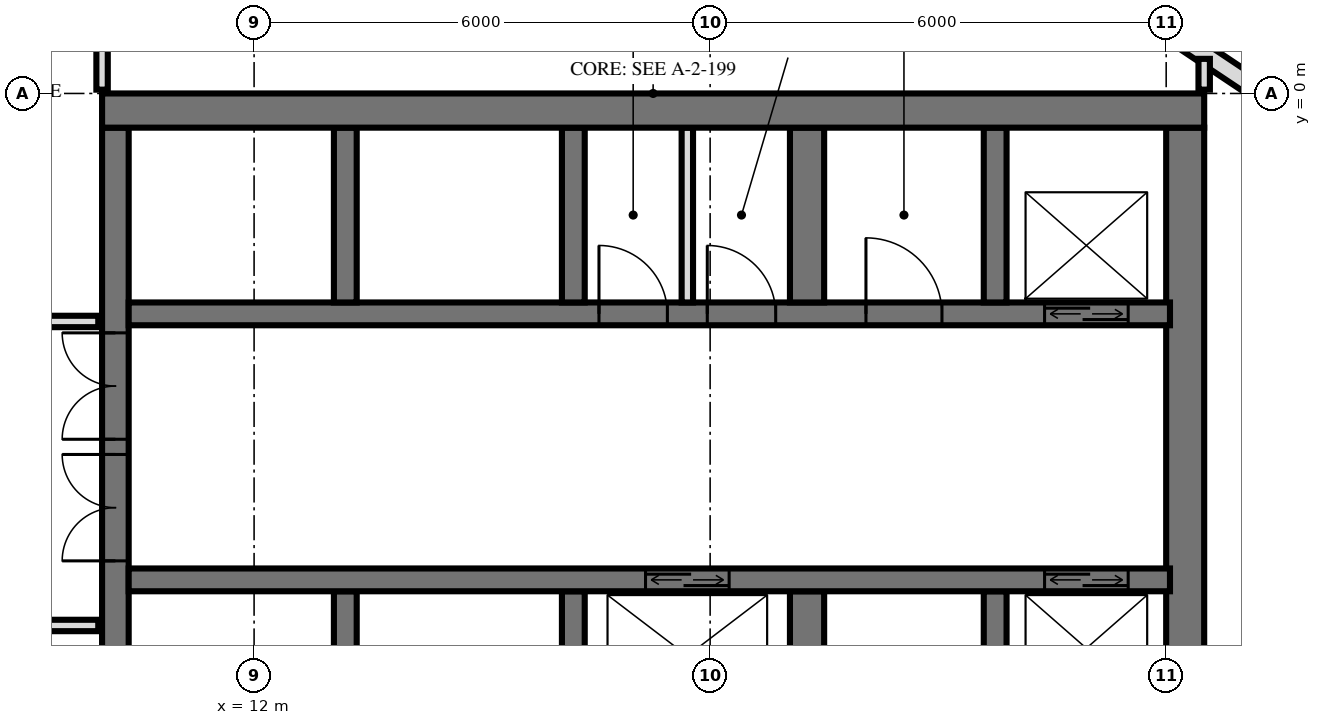
"""IFC4 building model, lengths in metres.
Left out: names, types, materials, properties, quantities, classifications, styles, units other than length and angle.
Written with IfcOpenShell. Run it as: python <this file> out.ifc"""

import sys

from ifc_helpers import new_model, si_unit, direction, frame, frame_2d, origin, place, context, subcontext, project, spatial, rectangle, extrude, element, fill, save


model = new_model("IFC4")
c1 = context("Model", 3, precision=1e-05, world=origin(), true_north=direction((0.0, 1.0)))
c2 = subcontext(c1, "Body", "Model", "MODEL_VIEW")
j1 = project(units=[si_unit("LENGTHUNIT", "METRE"), si_unit("PLANEANGLEUNIT", "RADIAN")], contexts=[c1])
p1 = place(None, origin())
s1 = spatial("IfcSite", under=j1, at=p1, CompositionType="ELEMENT")
p2 = place(p1, origin())
s2 = spatial("IfcBuilding", under=s1, at=p2, CompositionType="ELEMENT")
p3 = place(p2, frame((0.0, 0.0, 243.1)))
s3 = spatial("IfcBuildingStorey", under=s2, at=p3, CompositionType="ELEMENT", Elevation=243.1)
p4 = place(p3, frame((10.0, -0.225, 0.0), z_axis=(0.0, 0.0, 1.0), x_axis=(1.0, 0.0, 0.0)))
e1 = element("IfcWall", 1, at=p4, inside=s3, PredefinedType="SHEAR", context=c2, shape_type="SweptSolid", body=[
    extrude(rectangle(XDim=14.5, YDim=0.45, at=frame_2d((7.25, 0.0))), origin(), (0.0, 0.0, 1.0), 3.5),
])
p5 = place(p3, frame((10.175, -14.55, 0.0), z_axis=(0.0, 0.0, 1.0), x_axis=(0.0, 1.0, 0.0)))
e2 = element("IfcWall", 2, at=p5, inside=s3, PredefinedType="SHEAR", context=c2, shape_type="SweptSolid", body=[
    extrude(rectangle(XDim=14.1, YDim=0.35, at=frame_2d((7.05, 0.0))), origin(), (0.0, 0.0, 1.0), 3.5),
])
p6 = place(p5, frame((8.4, 0.0, 0.0)))
e3 = element("IfcOpeningElement", 3, at=p6, cuts=e2, PredefinedType="OPENING", context=c2, shape_type="SweptSolid", body=[
    extrude(rectangle(XDim=1.4, YDim=2.4, at=frame_2d((0.7, 1.2))), frame((0.0, 0.185, 0.0), z_axis=(0.0, -1.0, 0.0), x_axis=(1.0, 0.0, 0.0)), (0.0, 0.0, 1.0), 0.37),
])
p7 = place(p5, frame((10.0, 0.0, 0.0)))
e4 = element("IfcOpeningElement", 4, at=p7, cuts=e2, PredefinedType="OPENING", context=c2, shape_type="SweptSolid", body=[
    extrude(rectangle(XDim=1.4, YDim=2.4, at=frame_2d((0.7, 1.2))), frame((0.0, 0.185, 0.0), z_axis=(0.0, -1.0, 0.0), x_axis=(1.0, 0.0, 0.0)), (0.0, 0.0, 1.0), 0.37),
])
p8 = place(p5, frame((4.0, 0.0, 0.0)))
e5 = element("IfcOpeningElement", 5, at=p8, cuts=e2, PredefinedType="OPENING", context=c2, shape_type="SweptSolid", body=[
    extrude(rectangle(XDim=1.2, YDim=2.1, at=frame_2d((0.6, 1.05))), frame((0.0, 0.185, 0.0), z_axis=(0.0, -1.0, 0.0), x_axis=(1.0, 0.0, 0.0)), (0.0, 0.0, 1.0), 0.37),
])
p9 = place(p3, frame((24.25, -14.55, 0.0), z_axis=(0.0, 0.0, 1.0), x_axis=(0.0, 1.0, 0.0)))
e6 = element("IfcWall", 6, at=p9, inside=s3, PredefinedType="SHEAR", context=c2, shape_type="SweptSolid", body=[
    extrude(rectangle(XDim=14.1, YDim=0.5, at=frame_2d((7.05, 0.0))), origin(), (0.0, 0.0, 1.0), 3.5),
])
p10 = place(p3, frame((10.35, -2.9, 0.0), z_axis=(0.0, 0.0, 1.0), x_axis=(1.0, 0.0, 0.0)))
e7 = element("IfcWall", 7, at=p10, inside=s3, PredefinedType="SHEAR", context=c2, shape_type="SweptSolid", body=[
    extrude(rectangle(XDim=13.7, YDim=0.3, at=frame_2d((6.85, 0.0))), origin(), (0.0, 0.0, 1.0), 3.5),
])
p11 = place(p10, frame((12.05, 0.0, 0.0)))
e8 = element("IfcOpeningElement", 8, at=p11, cuts=e7, PredefinedType="OPENING", context=c2, shape_type="SweptSolid", body=[
    extrude(rectangle(XDim=1.1, YDim=2.1, at=frame_2d((0.55, 1.05))), frame((0.0, 0.16, 0.0), z_axis=(0.0, -1.0, 0.0), x_axis=(1.0, 0.0, 0.0)), (0.0, 0.0, 1.0), 0.32),
])
p12 = place(p10, frame((6.188, 0.0, 0.0)))
e9 = element("IfcOpeningElement", 9, at=p12, cuts=e7, PredefinedType="OPENING", context=c2, shape_type="SweptSolid", body=[
    extrude(rectangle(XDim=0.9, YDim=2.1, at=frame_2d((0.45, 1.05))), frame((0.0, 0.16, 0.0), z_axis=(0.0, -1.0, 0.0), x_axis=(1.0, 0.0, 0.0)), (0.0, 0.0, 1.0), 0.32),
])
p13 = place(p10, frame((7.613, 0.0, 0.0)))
e10 = element("IfcOpeningElement", 10, at=p13, cuts=e7, PredefinedType="OPENING", context=c2, shape_type="SweptSolid", body=[
    extrude(rectangle(XDim=0.9, YDim=2.1, at=frame_2d((0.45, 1.05))), frame((0.0, 0.16, 0.0), z_axis=(0.0, -1.0, 0.0), x_axis=(1.0, 0.0, 0.0)), (0.0, 0.0, 1.0), 0.32),
])
p14 = place(p10, frame((9.7, 0.0, 0.0)))
e11 = element("IfcOpeningElement", 11, at=p14, cuts=e7, PredefinedType="OPENING", context=c2, shape_type="SweptSolid", body=[
    extrude(rectangle(XDim=1.0, YDim=2.1, at=frame_2d((0.5, 1.05))), frame((0.0, 0.16, 0.0), z_axis=(0.0, -1.0, 0.0), x_axis=(1.0, 0.0, 0.0)), (0.0, 0.0, 1.0), 0.32),
])
p15 = place(p3, frame((10.35, -6.4, 0.0), z_axis=(0.0, 0.0, 1.0), x_axis=(1.0, 0.0, 0.0)))
e12 = element("IfcWall", 12, at=p15, inside=s3, PredefinedType="SHEAR", context=c2, shape_type="SweptSolid", body=[
    extrude(rectangle(XDim=13.7, YDim=0.3, at=frame_2d((6.85, 0.0))), origin(), (0.0, 0.0, 1.0), 3.5),
])
p16 = place(p15, frame((12.05, 0.0, 0.0)))
e13 = element("IfcOpeningElement", 13, at=p16, cuts=e12, PredefinedType="OPENING", context=c2, shape_type="SweptSolid", body=[
    extrude(rectangle(XDim=1.1, YDim=2.1, at=frame_2d((0.55, 1.05))), frame((0.0, 0.16, 0.0), z_axis=(0.0, -1.0, 0.0), x_axis=(1.0, 0.0, 0.0)), (0.0, 0.0, 1.0), 0.32),
])
p17 = place(p15, frame((6.8, 0.0, 0.0)))
e14 = element("IfcOpeningElement", 14, at=p17, cuts=e12, PredefinedType="OPENING", context=c2, shape_type="SweptSolid", body=[
    extrude(rectangle(XDim=1.1, YDim=2.1, at=frame_2d((0.55, 1.05))), frame((0.0, 0.16, 0.0), z_axis=(0.0, -1.0, 0.0), x_axis=(1.0, 0.0, 0.0)), (0.0, 0.0, 1.0), 0.32),
])
for number, where, z_axis, x_axis in (
    (15, (13.2, -2.75, 0.0), (0.0, 0.0, 1.0), (0.0, 1.0, 0.0)),
    (16, (13.2, -8.85, 0.0), (0.0, 0.0, 1.0), (0.0, 1.0, 0.0)),
    (17, (16.2, -2.75, 0.0), (0.0, 0.0, 1.0), (0.0, 1.0, 0.0)),
    (18, (16.2, -8.85, 0.0), (0.0, 0.0, 1.0), (0.0, 1.0, 0.0)),
):
    element("IfcWall", number, at=place(p3, frame(where, z_axis=z_axis, x_axis=x_axis)), inside=s3, PredefinedType="SHEAR", context=c2, shape_type="SweptSolid", body=[
        extrude(rectangle(XDim=2.3, YDim=0.3, at=frame_2d((1.15, 0.0))), origin(), (0.0, 0.0, 1.0), 3.5),
    ])
for number, where, z_axis, x_axis in (
    (19, (19.275, -2.75, 0.0), (0.0, 0.0, 1.0), (0.0, 1.0, 0.0)),
    (20, (19.275, -8.85, 0.0), (0.0, 0.0, 1.0), (0.0, 1.0, 0.0)),
):
    element("IfcWall", number, at=place(p3, frame(where, z_axis=z_axis, x_axis=x_axis)), inside=s3, PredefinedType="SHEAR", context=c2, shape_type="SweptSolid", body=[
        extrude(rectangle(XDim=2.3, YDim=0.45, at=frame_2d((1.15, 0.0))), origin(), (0.0, 0.0, 1.0), 3.5),
    ])
for number, where, z_axis, x_axis in (
    (21, (21.75, -2.75, 0.0), (0.0, 0.0, 1.0), (0.0, 1.0, 0.0)),
    (22, (21.75, -8.85, 0.0), (0.0, 0.0, 1.0), (0.0, 1.0, 0.0)),
):
    element("IfcWall", number, at=place(p3, frame(where, z_axis=z_axis, x_axis=x_axis)), inside=s3, PredefinedType="SHEAR", context=c2, shape_type="SweptSolid", body=[
        extrude(rectangle(XDim=2.3, YDim=0.3, at=frame_2d((1.15, 0.0))), origin(), (0.0, 0.0, 1.0), 3.5),
    ])
p18 = place(p3, frame((25.571, -0.194, 0.0), z_axis=(0.0, 0.0, 1.0), x_axis=(-0.831482937015, 0.55555029066, 0.0)))
e23 = element("IfcWall", 23, at=p18, inside=s3, PredefinedType="SOLIDWALL", context=c2, shape_type="SweptSolid", body=[
    extrude(rectangle(XDim=1.656, YDim=0.25, at=frame_2d((0.828, 0.0))), origin(), (0.0, 0.0, 1.0), 3.2),
])
p19 = place(p3, frame((17.7, -2.75, 0.0), z_axis=(0.0, 0.0, 1.0), x_axis=(0.0, 1.0, 0.0)))
e24 = element("IfcWall", 24, at=p19, inside=s3, PredefinedType="PARTITIONING", context=c2, shape_type="SweptSolid", body=[
    extrude(rectangle(XDim=2.3, YDim=0.15, at=frame_2d((1.15, 0.0))), origin(), (0.0, 0.0, 1.0), 3.2),
])
p20 = place(p3, frame((24.5, 0.05, 0.0), z_axis=(0.0, 0.0, 1.0), x_axis=(0.0, 1.0, 0.0)))
e25 = element("IfcWall", 25, at=p20, inside=s3, PredefinedType="PARTITIONING", context=c2, shape_type="SweptSolid", body=[
    extrude(rectangle(XDim=0.405, YDim=0.15, at=frame_2d((0.203, 0.0))), origin(), (0.0, 0.0, 1.0), 3.22),
])
p21 = place(p3, frame((10.0, 0.05, 0.0), z_axis=(0.0, 0.0, 1.0), x_axis=(0.0, 1.0, 0.0)))
e26 = element("IfcWall", 26, at=p21, inside=s3, PredefinedType="PLUMBINGWALL", context=c2, shape_type="SweptSolid", body=[
    extrude(rectangle(XDim=0.97, YDim=0.15, at=frame_2d((0.485, 0.0))), origin(), (0.0, 0.0, 1.0), 3.22),
])
p22 = place(p3, frame((-9.95, -7.0, 0.0), z_axis=(0.0, 0.0, 1.0), x_axis=(1.0, 0.0, 0.0)))
e27 = element("IfcWall", 27, at=p22, inside=s3, PredefinedType="PARTITIONING", context=c2, shape_type="SweptSolid", body=[
    extrude(rectangle(XDim=19.9, YDim=0.15, at=frame_2d((9.95, 0.0))), origin(), (0.0, 0.0, 1.0), 3.22),
])
p23 = place(p22, frame((9.45, 0.0, 0.0)))
e28 = element("IfcOpeningElement", 28, at=p23, cuts=e27, PredefinedType="OPENING", context=c2, shape_type="SweptSolid", body=[
    extrude(rectangle(XDim=1.0, YDim=2.1, at=frame_2d((0.5, 1.05))), frame((0.0, 0.085, 0.0), z_axis=(0.0, -1.0, 0.0), x_axis=(1.0, 0.0, 0.0)), (0.0, 0.0, 1.0), 0.17),
])
p24 = place(p22, frame((15.45, 0.0, 0.0)))
e29 = element("IfcOpeningElement", 29, at=p24, cuts=e27, PredefinedType="OPENING", context=c2, shape_type="SweptSolid", body=[
    extrude(rectangle(XDim=1.0, YDim=2.1, at=frame_2d((0.5, 1.05))), frame((0.0, 0.085, 0.0), z_axis=(0.0, -1.0, 0.0), x_axis=(1.0, 0.0, 0.0)), (0.0, 0.0, 1.0), 0.17),
])
p25 = place(p3, frame((-9.95, -3.0, 0.0), z_axis=(0.0, 0.0, 1.0), x_axis=(1.0, 0.0, 0.0)))
e30 = element("IfcWall", 30, at=p25, inside=s3, PredefinedType="PARTITIONING", context=c2, shape_type="SweptSolid", body=[
    extrude(rectangle(XDim=19.9, YDim=0.15, at=frame_2d((9.95, 0.0))), origin(), (0.0, 0.0, 1.0), 3.22),
])
p26 = place(p25, frame((2.2, 0.0, 0.0)))
e31 = element("IfcOpeningElement", 31, at=p26, cuts=e30, PredefinedType="OPENING", context=c2, shape_type="SweptSolid", body=[
    extrude(rectangle(XDim=1.0, YDim=2.1, at=frame_2d((0.5, 1.05))), frame((0.0, 0.085, 0.0), z_axis=(0.0, -1.0, 0.0), x_axis=(1.0, 0.0, 0.0)), (0.0, 0.0, 1.0), 0.17),
])
p27 = place(p25, frame((7.2, 0.0, 0.0)))
e32 = element("IfcOpeningElement", 32, at=p27, cuts=e30, PredefinedType="OPENING", context=c2, shape_type="SweptSolid", body=[
    extrude(rectangle(XDim=1.0, YDim=2.1, at=frame_2d((0.5, 1.05))), frame((0.0, 0.085, 0.0), z_axis=(0.0, -1.0, 0.0), x_axis=(1.0, 0.0, 0.0)), (0.0, 0.0, 1.0), 0.17),
])
p28 = place(p25, frame((11.7, 0.0, 0.0)))
e33 = element("IfcOpeningElement", 33, at=p28, cuts=e30, PredefinedType="OPENING", context=c2, shape_type="SweptSolid", body=[
    extrude(rectangle(XDim=1.0, YDim=2.1, at=frame_2d((0.5, 1.05))), frame((0.0, 0.085, 0.0), z_axis=(0.0, -1.0, 0.0), x_axis=(1.0, 0.0, 0.0)), (0.0, 0.0, 1.0), 0.17),
])
p29 = place(p25, frame((15.45, 0.0, 0.0)))
e34 = element("IfcOpeningElement", 34, at=p29, cuts=e30, PredefinedType="OPENING", context=c2, shape_type="SweptSolid", body=[
    extrude(rectangle(XDim=1.0, YDim=2.1, at=frame_2d((0.5, 1.05))), frame((0.0, 0.085, 0.0), z_axis=(0.0, -1.0, 0.0), x_axis=(1.0, 0.0, 0.0)), (0.0, 0.0, 1.0), 0.17),
])
p30 = place(p25, frame((18.2, 0.0, 0.0)))
e35 = element("IfcOpeningElement", 35, at=p30, cuts=e30, PredefinedType="OPENING", context=c2, shape_type="SweptSolid", body=[
    extrude(rectangle(XDim=1.0, YDim=2.1, at=frame_2d((0.5, 1.05))), frame((0.0, 0.085, 0.0), z_axis=(0.0, -1.0, 0.0), x_axis=(1.0, 0.0, 0.0)), (0.0, 0.0, 1.0), 0.17),
])
p31 = place(p11, origin())
e36 = element("IfcDoor", 36, at=p31, inside=s3, OperationType="DOUBLE_DOOR_SLIDING", PredefinedType="USERDEFINED", context=c2, shape_type="SweptSolid", body=[
    extrude(rectangle(XDim=1.1, YDim=2.1, at=frame_2d((0.55, 1.05))), frame((0.0, 0.025, 0.0), z_axis=(0.0, -1.0, 0.0), x_axis=(1.0, 0.0, 0.0)), (0.0, 0.0, 1.0), 0.05),
])
fill(e8, e36)
p32 = place(p16, origin())
e37 = element("IfcDoor", 37, at=p32, inside=s3, OperationType="DOUBLE_DOOR_SLIDING", PredefinedType="USERDEFINED", context=c2, shape_type="SweptSolid", body=[
    extrude(rectangle(XDim=1.1, YDim=2.1, at=frame_2d((0.55, 1.05))), frame((0.0, 0.025, 0.0), z_axis=(0.0, -1.0, 0.0), x_axis=(1.0, 0.0, 0.0)), (0.0, 0.0, 1.0), 0.05),
])
fill(e13, e37)
p33 = place(p17, origin())
e38 = element("IfcDoor", 38, at=p33, inside=s3, OperationType="DOUBLE_DOOR_SLIDING", PredefinedType="USERDEFINED", context=c2, shape_type="SweptSolid", body=[
    extrude(rectangle(XDim=1.1, YDim=2.1, at=frame_2d((0.55, 1.05))), frame((0.0, 0.025, 0.0), z_axis=(0.0, -1.0, 0.0), x_axis=(1.0, 0.0, 0.0)), (0.0, 0.0, 1.0), 0.05),
])
fill(e14, e38)
p34 = place(p6, origin())
e39 = element("IfcDoor", 39, at=p34, inside=s3, OperationType="DOUBLE_DOOR_SINGLE_SWING", PredefinedType="DOOR", context=c2, shape_type="SweptSolid", body=[
    extrude(rectangle(XDim=1.4, YDim=2.4, at=frame_2d((0.7, 1.2))), frame((0.0, 0.025, 0.0), z_axis=(0.0, -1.0, 0.0), x_axis=(1.0, 0.0, 0.0)), (0.0, 0.0, 1.0), 0.05),
])
fill(e3, e39)
p35 = place(p7, origin())
e40 = element("IfcDoor", 40, at=p35, inside=s3, OperationType="DOUBLE_DOOR_SINGLE_SWING", PredefinedType="DOOR", context=c2, shape_type="SweptSolid", body=[
    extrude(rectangle(XDim=1.4, YDim=2.4, at=frame_2d((0.7, 1.2))), frame((0.0, 0.025, 0.0), z_axis=(0.0, -1.0, 0.0), x_axis=(1.0, 0.0, 0.0)), (0.0, 0.0, 1.0), 0.05),
])
fill(e4, e40)
p36 = place(p12, origin())
e41 = element("IfcDoor", 41, at=p36, inside=s3, OperationType="SINGLE_SWING_RIGHT", PredefinedType="DOOR", context=c2, shape_type="SweptSolid", body=[
    extrude(rectangle(XDim=0.9, YDim=2.1, at=frame_2d((0.45, 1.05))), frame((0.0, 0.025, 0.0), z_axis=(0.0, -1.0, 0.0), x_axis=(1.0, 0.0, 0.0)), (0.0, 0.0, 1.0), 0.05),
])
fill(e9, e41)
p37 = place(p13, origin())
e42 = element("IfcDoor", 42, at=p37, inside=s3, OperationType="SINGLE_SWING_RIGHT", PredefinedType="DOOR", context=c2, shape_type="SweptSolid", body=[
    extrude(rectangle(XDim=0.9, YDim=2.1, at=frame_2d((0.45, 1.05))), frame((0.0, 0.025, 0.0), z_axis=(0.0, -1.0, 0.0), x_axis=(1.0, 0.0, 0.0)), (0.0, 0.0, 1.0), 0.05),
])
fill(e10, e42)
p38 = place(p14, origin())
e43 = element("IfcDoor", 43, at=p38, inside=s3, OperationType="SINGLE_SWING_RIGHT", PredefinedType="DOOR", context=c2, shape_type="SweptSolid", body=[
    extrude(rectangle(XDim=1.0, YDim=2.1, at=frame_2d((0.5, 1.05))), frame((0.0, 0.025, 0.0), z_axis=(0.0, -1.0, 0.0), x_axis=(1.0, 0.0, 0.0)), (0.0, 0.0, 1.0), 0.05),
])
fill(e11, e43)
save(model, sys.argv[1])
